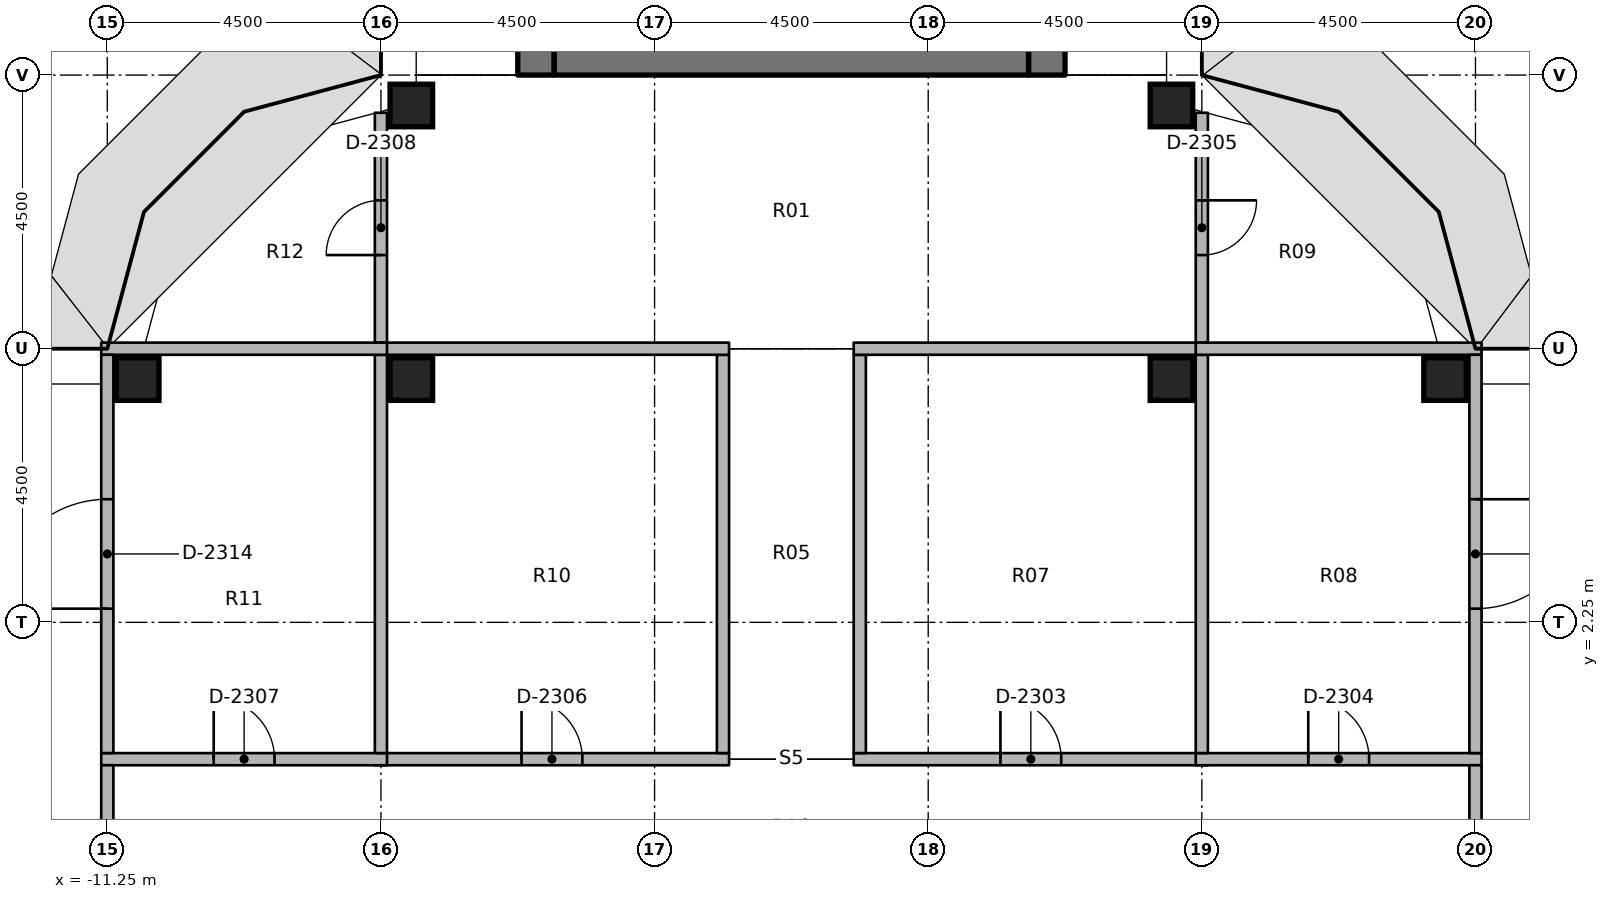
"""IFC4 building model, lengths in metres.
Left out: names, types, materials, properties, quantities, classifications, styles, units other than length and angle.
Written with IfcOpenShell. Run it as: python <this file> out.ifc"""

import sys

from ifc_helpers import new_model, si_unit, direction, frame, frame_2d, origin, origin_2d, place, context, subcontext, project, spatial, rectangle, extrude, element, fill, save


model = new_model("IFC4")
c1 = context("Model", 3, precision=1e-05, world=origin(), true_north=direction((0.0, 1.0)))
c2 = subcontext(c1, "Body", "Model", "MODEL_VIEW")
j1 = project(units=[si_unit("LENGTHUNIT", "METRE"), si_unit("PLANEANGLEUNIT", "RADIAN")], contexts=[c1])
p1 = place(None, origin())
s1 = spatial("IfcSite", under=j1, at=p1, CompositionType="ELEMENT")
p2 = place(p1, origin())
s2 = spatial("IfcBuilding", under=s1, at=p2, CompositionType="ELEMENT")
p3 = place(p2, frame((0.0, 0.0, 218.2)))
s3 = spatial("IfcBuildingStorey", under=s2, at=p3, CompositionType="ELEMENT", Elevation=218.2)
for number, where, z_axis, x_axis in (
    (1, (-10.75, 6.25, 0.0), (0.0, 0.0, 1.0), (1.0, 0.0, 0.0)),
    (2, (-6.25, 6.25, 0.0), (0.0, 0.0, 1.0), (1.0, 0.0, 0.0)),
    (3, (-6.25, 10.75, 0.0), (0.0, 0.0, 1.0), (1.0, 0.0, 0.0)),
    (4, (6.25, 6.25, 0.0), (0.0, 0.0, 1.0), (1.0, 0.0, 0.0)),
    (5, (6.25, 10.75, 0.0), (0.0, 0.0, 1.0), (1.0, 0.0, 0.0)),
    (6, (10.75, 6.25, 0.0), (0.0, 0.0, 1.0), (1.0, 0.0, 0.0)),
):
    element("IfcColumn", number, at=place(p3, frame(where, z_axis=z_axis, x_axis=x_axis)), inside=s3, PredefinedType="COLUMN", context=c2, shape_type="SweptSolid", body=[
        extrude(rectangle(XDim=0.7, YDim=0.7, at=origin_2d()), origin(), (0.0, 0.0, 1.0), 3.65),
    ])
p4 = place(p3, frame((-4.2, 11.25, 0.0), z_axis=(0.0, 0.0, 1.0), x_axis=(0.0, 1.0, 0.0)))
e7 = element("IfcWall", 7, at=p4, inside=s3, PredefinedType="SHEAR", context=c2, shape_type="SweptSolid", body=[
    extrude(rectangle(XDim=15.0, YDim=0.6, at=frame_2d((7.5, 0.0))), origin(), (0.0, 0.0, 1.0), 3.8),
])
p5 = place(p4, frame((7.15, 0.0, 0.0)))
e8 = element("IfcOpeningElement", 8, at=p5, cuts=e7, PredefinedType="OPENING", context=c2, shape_type="SweptSolid", body=[
    extrude(rectangle(XDim=1.5, YDim=2.3, at=frame_2d((0.75, 1.15))), frame((0.0, 0.31, 0.0), z_axis=(0.0, -1.0, 0.0), x_axis=(1.0, 0.0, 0.0)), (0.0, 0.0, 1.0), 0.62),
])
p6 = place(p4, frame((13.9, 0.0, 0.0)))
e9 = element("IfcOpeningElement", 9, at=p6, cuts=e7, PredefinedType="OPENING", context=c2, shape_type="SweptSolid", body=[
    extrude(rectangle(XDim=0.9, YDim=2.1, at=frame_2d((0.45, 1.05))), frame((0.0, 0.31, 0.0), z_axis=(0.0, -1.0, 0.0), x_axis=(1.0, 0.0, 0.0)), (0.0, 0.0, 1.0), 0.62),
])
p7 = place(p4, frame((1.15, 0.0, 0.0)))
e10 = element("IfcOpeningElement", 10, at=p7, cuts=e7, PredefinedType="OPENING", context=c2, shape_type="SweptSolid", body=[
    extrude(rectangle(XDim=1.2, YDim=2.1, at=frame_2d((0.6, 1.05))), frame((0.0, 0.31, 0.0), z_axis=(0.0, -1.0, 0.0), x_axis=(1.0, 0.0, 0.0)), (0.0, 0.0, 1.0), 0.62),
])
p8 = place(p3, frame((4.2, 11.25, 0.0), z_axis=(0.0, 0.0, 1.0), x_axis=(0.0, 1.0, 0.0)))
e11 = element("IfcWall", 11, at=p8, inside=s3, PredefinedType="SHEAR", context=c2, shape_type="SweptSolid", body=[
    extrude(rectangle(XDim=15.0, YDim=0.6, at=frame_2d((7.5, 0.0))), origin(), (0.0, 0.0, 1.0), 3.8),
])
p9 = place(p8, frame((7.15, 0.0, 0.0)))
e12 = element("IfcOpeningElement", 12, at=p9, cuts=e11, PredefinedType="OPENING", context=c2, shape_type="SweptSolid", body=[
    extrude(rectangle(XDim=1.5, YDim=2.3, at=frame_2d((0.75, 1.15))), frame((0.0, 0.31, 0.0), z_axis=(0.0, -1.0, 0.0), x_axis=(1.0, 0.0, 0.0)), (0.0, 0.0, 1.0), 0.62),
])
p10 = place(p8, frame((5.55, 0.0, 0.0)))
e13 = element("IfcOpeningElement", 13, at=p10, cuts=e11, PredefinedType="OPENING", context=c2, shape_type="SweptSolid", body=[
    extrude(rectangle(XDim=1.2, YDim=2.1, at=frame_2d((0.6, 1.05))), frame((0.0, 0.31, 0.0), z_axis=(0.0, -1.0, 0.0), x_axis=(1.0, 0.0, 0.0)), (0.0, 0.0, 1.0), 0.62),
])
p11 = place(p3, frame((-3.9, 11.55, 0.0), z_axis=(0.0, 0.0, 1.0), x_axis=(1.0, 0.0, 0.0)))
e14 = element("IfcWall", 14, at=p11, inside=s3, PredefinedType="SHEAR", context=c2, shape_type="SweptSolid", body=[
    extrude(rectangle(XDim=7.8, YDim=0.6, at=frame_2d((3.9, 0.0))), origin(), (0.0, 0.0, 1.0), 3.8),
])
p12 = place(p3, frame((1.025, 0.0, 0.0), z_axis=(0.0, 0.0, 1.0), x_axis=(1.0, 0.0, 0.0)))
e15 = element("IfcWall", 15, at=p12, inside=s3, PredefinedType="PARTITIONING", context=c2, shape_type="SweptSolid", body=[
    extrude(rectangle(XDim=5.825, YDim=0.2, at=frame_2d((2.913, 0.0))), origin(), (0.0, 0.0, 1.0), 2.75),
])
p13 = place(p12, frame((2.413, 0.0, 0.0)))
e16 = element("IfcOpeningElement", 16, at=p13, cuts=e15, PredefinedType="OPENING", context=c2, shape_type="SweptSolid", body=[
    extrude(rectangle(XDim=1.0, YDim=2.1, at=frame_2d((0.5, 1.05))), frame((0.0, 0.11, 0.0), z_axis=(0.0, -1.0, 0.0), x_axis=(1.0, 0.0, 0.0)), (0.0, 0.0, 1.0), 0.22),
])
p14 = place(p3, frame((6.65, 0.0, 0.0), z_axis=(0.0, 0.0, 1.0), x_axis=(1.0, 0.0, 0.0)))
e17 = element("IfcWall", 17, at=p14, inside=s3, PredefinedType="PARTITIONING", context=c2, shape_type="SweptSolid", body=[
    extrude(rectangle(XDim=4.7, YDim=0.2, at=frame_2d((2.35, 0.0))), origin(), (0.0, 0.0, 1.0), 2.75),
])
p15 = place(p14, frame((1.85, 0.0, 0.0)))
e18 = element("IfcOpeningElement", 18, at=p15, cuts=e17, PredefinedType="OPENING", context=c2, shape_type="SweptSolid", body=[
    extrude(rectangle(XDim=1.0, YDim=2.1, at=frame_2d((0.5, 1.05))), frame((0.0, 0.11, 0.0), z_axis=(0.0, -1.0, 0.0), x_axis=(1.0, 0.0, 0.0)), (0.0, 0.0, 1.0), 0.22),
])
p16 = place(p3, frame((-6.85, 0.0, 0.0), z_axis=(0.0, 0.0, 1.0), x_axis=(1.0, 0.0, 0.0)))
e19 = element("IfcWall", 19, at=p16, inside=s3, PredefinedType="PARTITIONING", context=c2, shape_type="SweptSolid", body=[
    extrude(rectangle(XDim=5.825, YDim=0.2, at=frame_2d((2.913, 0.0))), origin(), (0.0, 0.0, 1.0), 2.75),
])
p17 = place(p16, frame((2.413, 0.0, 0.0)))
e20 = element("IfcOpeningElement", 20, at=p17, cuts=e19, PredefinedType="OPENING", context=c2, shape_type="SweptSolid", body=[
    extrude(rectangle(XDim=1.0, YDim=2.1, at=frame_2d((0.5, 1.05))), frame((0.0, 0.11, 0.0), z_axis=(0.0, -1.0, 0.0), x_axis=(1.0, 0.0, 0.0)), (0.0, 0.0, 1.0), 0.22),
])
p18 = place(p3, frame((-11.35, 0.0, 0.0), z_axis=(0.0, 0.0, 1.0), x_axis=(1.0, 0.0, 0.0)))
e21 = element("IfcWall", 21, at=p18, inside=s3, PredefinedType="PARTITIONING", context=c2, shape_type="SweptSolid", body=[
    extrude(rectangle(XDim=4.7, YDim=0.2, at=frame_2d((2.35, 0.0))), origin(), (0.0, 0.0, 1.0), 2.75),
])
p19 = place(p18, frame((1.85, 0.0, 0.0)))
e22 = element("IfcOpeningElement", 22, at=p19, cuts=e21, PredefinedType="OPENING", context=c2, shape_type="SweptSolid", body=[
    extrude(rectangle(XDim=1.0, YDim=2.1, at=frame_2d((0.5, 1.05))), frame((0.0, 0.11, 0.0), z_axis=(0.0, -1.0, 0.0), x_axis=(1.0, 0.0, 0.0)), (0.0, 0.0, 1.0), 0.22),
])
for number, where, z_axis, x_axis in (
    (23, (11.25, -2.15, 0.0), (0.0, 0.0, 1.0), (0.0, 1.0, 0.0)),
    (24, (-11.25, -2.15, 0.0), (0.0, 0.0, 1.0), (0.0, 1.0, 0.0)),
):
    element("IfcWall", number, at=place(p3, frame(where, z_axis=z_axis, x_axis=x_axis)), inside=s3, PredefinedType="PARTITIONING", context=c2, shape_type="SweptSolid", body=[
        extrude(rectangle(XDim=2.05, YDim=0.2, at=frame_2d((1.025, 0.0))), origin(), (0.0, 0.0, 1.0), 2.75),
    ])
for number, where, z_axis, x_axis in (
    (25, (1.125, 0.1, 0.0), (0.0, 0.0, 1.0), (0.0, 1.0, 0.0)),
    (26, (-1.125, 0.1, 0.0), (0.0, 0.0, 1.0), (0.0, 1.0, 0.0)),
):
    element("IfcWall", number, at=place(p3, frame(where, z_axis=z_axis, x_axis=x_axis)), inside=s3, PredefinedType="PARTITIONING", context=c2, shape_type="SweptSolid", body=[
        extrude(rectangle(XDim=6.55, YDim=0.2, at=frame_2d((3.275, 0.0))), origin(), (0.0, 0.0, 1.0), 2.75),
    ])
p20 = place(p3, frame((1.025, 6.75, 0.0), z_axis=(0.0, 0.0, 1.0), x_axis=(1.0, 0.0, 0.0)))
e27 = element("IfcWall", 27, at=p20, inside=s3, PredefinedType="PARTITIONING", context=c2, shape_type="SweptSolid", body=[
    extrude(rectangle(XDim=5.825, YDim=0.2, at=frame_2d((2.913, 0.0))), origin(), (0.0, 0.0, 1.0), 2.75),
])
p21 = place(p3, frame((6.75, 10.63, 0.0), z_axis=(0.0, 0.0, 1.0), x_axis=(0.0, -1.0, 0.0)))
e28 = element("IfcWall", 28, at=p21, inside=s3, PredefinedType="PARTITIONING", context=c2, shape_type="SweptSolid", body=[
    extrude(rectangle(XDim=3.78, YDim=0.2, at=frame_2d((1.89, 0.0))), origin(), (0.0, 0.0, 1.0), 2.75),
])
p22 = place(p21, frame((1.44, 0.0, 0.0)))
e29 = element("IfcOpeningElement", 29, at=p22, cuts=e28, PredefinedType="OPENING", context=c2, shape_type="SweptSolid", body=[
    extrude(rectangle(XDim=0.9, YDim=2.1, at=frame_2d((0.45, 1.05))), frame((0.0, 0.11, 0.0), z_axis=(0.0, -1.0, 0.0), x_axis=(1.0, 0.0, 0.0)), (0.0, 0.0, 1.0), 0.22),
])
p23 = place(p3, frame((-6.85, 6.75, 0.0), z_axis=(0.0, 0.0, 1.0), x_axis=(1.0, 0.0, 0.0)))
e30 = element("IfcWall", 30, at=p23, inside=s3, PredefinedType="PARTITIONING", context=c2, shape_type="SweptSolid", body=[
    extrude(rectangle(XDim=5.825, YDim=0.2, at=frame_2d((2.913, 0.0))), origin(), (0.0, 0.0, 1.0), 2.75),
])
p24 = place(p3, frame((-6.75, 6.85, 0.0), z_axis=(0.0, 0.0, 1.0), x_axis=(0.0, 1.0, 0.0)))
e31 = element("IfcWall", 31, at=p24, inside=s3, PredefinedType="PARTITIONING", context=c2, shape_type="SweptSolid", body=[
    extrude(rectangle(XDim=3.78, YDim=0.2, at=frame_2d((1.89, 0.0))), origin(), (0.0, 0.0, 1.0), 2.75),
])
p25 = place(p24, frame((1.44, 0.0, 0.0)))
e32 = element("IfcOpeningElement", 32, at=p25, cuts=e31, PredefinedType="OPENING", context=c2, shape_type="SweptSolid", body=[
    extrude(rectangle(XDim=0.9, YDim=2.1, at=frame_2d((0.45, 1.05))), frame((0.0, 0.11, 0.0), z_axis=(0.0, -1.0, 0.0), x_axis=(1.0, 0.0, 0.0)), (0.0, 0.0, 1.0), 0.22),
])
p26 = place(p3, frame((6.75, 0.1, 0.0), z_axis=(0.0, 0.0, 1.0), x_axis=(0.0, 1.0, 0.0)))
e33 = element("IfcWall", 33, at=p26, inside=s3, PredefinedType="PARTITIONING", context=c2, shape_type="SweptSolid", body=[
    extrude(rectangle(XDim=6.55, YDim=0.2, at=frame_2d((3.275, 0.0))), origin(), (0.0, 0.0, 1.0), 2.75),
])
p27 = place(p3, frame((6.65, 6.75, 0.0), z_axis=(0.0, 0.0, 1.0), x_axis=(1.0, 0.0, 0.0)))
e34 = element("IfcWall", 34, at=p27, inside=s3, PredefinedType="PARTITIONING", context=c2, shape_type="SweptSolid", body=[
    extrude(rectangle(XDim=4.7, YDim=0.2, at=frame_2d((2.35, 0.0))), origin(), (0.0, 0.0, 1.0), 2.75),
])
p28 = place(p3, frame((11.25, 6.65, 0.0), z_axis=(0.0, 0.0, 1.0), x_axis=(0.0, -1.0, 0.0)))
e35 = element("IfcWall", 35, at=p28, inside=s3, PredefinedType="PARTITIONING", context=c2, shape_type="SweptSolid", body=[
    extrude(rectangle(XDim=6.55, YDim=0.2, at=frame_2d((3.275, 0.0))), origin(), (0.0, 0.0, 1.0), 2.75),
])
p29 = place(p28, frame((2.375, 0.0, 0.0)))
e36 = element("IfcOpeningElement", 36, at=p29, cuts=e35, PredefinedType="OPENING", context=c2, shape_type="SweptSolid", body=[
    extrude(rectangle(XDim=1.8, YDim=2.1, at=frame_2d((0.9, 1.05))), frame((0.0, 0.11, 0.0), z_axis=(0.0, -1.0, 0.0), x_axis=(1.0, 0.0, 0.0)), (0.0, 0.0, 1.0), 0.22),
])
p30 = place(p3, frame((-6.75, 0.1, 0.0), z_axis=(0.0, 0.0, 1.0), x_axis=(0.0, 1.0, 0.0)))
e37 = element("IfcWall", 37, at=p30, inside=s3, PredefinedType="PARTITIONING", context=c2, shape_type="SweptSolid", body=[
    extrude(rectangle(XDim=6.55, YDim=0.2, at=frame_2d((3.275, 0.0))), origin(), (0.0, 0.0, 1.0), 2.75),
])
p31 = place(p3, frame((-11.35, 6.75, 0.0), z_axis=(0.0, 0.0, 1.0), x_axis=(1.0, 0.0, 0.0)))
e38 = element("IfcWall", 38, at=p31, inside=s3, PredefinedType="PARTITIONING", context=c2, shape_type="SweptSolid", body=[
    extrude(rectangle(XDim=4.7, YDim=0.2, at=frame_2d((2.35, 0.0))), origin(), (0.0, 0.0, 1.0), 2.75),
])
p32 = place(p3, frame((-11.25, 0.1, 0.0), z_axis=(0.0, 0.0, 1.0), x_axis=(0.0, 1.0, 0.0)))
e39 = element("IfcWall", 39, at=p32, inside=s3, PredefinedType="PARTITIONING", context=c2, shape_type="SweptSolid", body=[
    extrude(rectangle(XDim=6.55, YDim=0.2, at=frame_2d((3.275, 0.0))), origin(), (0.0, 0.0, 1.0), 2.75),
])
p33 = place(p32, frame((2.375, 0.0, 0.0)))
e40 = element("IfcOpeningElement", 40, at=p33, cuts=e39, PredefinedType="OPENING", context=c2, shape_type="SweptSolid", body=[
    extrude(rectangle(XDim=1.8, YDim=2.1, at=frame_2d((0.9, 1.05))), frame((0.0, 0.11, 0.0), z_axis=(0.0, -1.0, 0.0), x_axis=(1.0, 0.0, 0.0)), (0.0, 0.0, 1.0), 0.22),
])
p34 = place(p29, origin())
e41 = element("IfcDoor", 41, at=p34, inside=s3, OperationType="DOUBLE_DOOR_SINGLE_SWING", PredefinedType="DOOR", context=c2, shape_type="SweptSolid", body=[
    extrude(rectangle(XDim=1.8, YDim=2.1, at=frame_2d((0.9, 1.05))), frame((0.0, 0.025, 0.0), z_axis=(0.0, -1.0, 0.0), x_axis=(1.0, 0.0, 0.0)), (0.0, 0.0, 1.0), 0.05),
])
fill(e36, e41)
p35 = place(p13, origin())
e42 = element("IfcDoor", 42, at=p35, inside=s3, OperationType="SINGLE_SWING_RIGHT", PredefinedType="DOOR", context=c2, shape_type="SweptSolid", body=[
    extrude(rectangle(XDim=1.0, YDim=2.1, at=frame_2d((0.5, 1.05))), frame((0.0, 0.025, 0.0), z_axis=(0.0, -1.0, 0.0), x_axis=(1.0, 0.0, 0.0)), (0.0, 0.0, 1.0), 0.05),
])
fill(e16, e42)
p36 = place(p15, origin())
e43 = element("IfcDoor", 43, at=p36, inside=s3, OperationType="SINGLE_SWING_RIGHT", PredefinedType="DOOR", context=c2, shape_type="SweptSolid", body=[
    extrude(rectangle(XDim=1.0, YDim=2.1, at=frame_2d((0.5, 1.05))), frame((0.0, 0.025, 0.0), z_axis=(0.0, -1.0, 0.0), x_axis=(1.0, 0.0, 0.0)), (0.0, 0.0, 1.0), 0.05),
])
fill(e18, e43)
p37 = place(p22, origin())
e44 = element("IfcDoor", 44, at=p37, inside=s3, OperationType="SINGLE_SWING_RIGHT", PredefinedType="DOOR", context=c2, shape_type="SweptSolid", body=[
    extrude(rectangle(XDim=0.9, YDim=2.1, at=frame_2d((0.45, 1.05))), frame((0.0, 0.025, 0.0), z_axis=(0.0, -1.0, 0.0), x_axis=(1.0, 0.0, 0.0)), (0.0, 0.0, 1.0), 0.05),
])
fill(e29, e44)
p38 = place(p17, origin())
e45 = element("IfcDoor", 45, at=p38, inside=s3, OperationType="SINGLE_SWING_RIGHT", PredefinedType="DOOR", context=c2, shape_type="SweptSolid", body=[
    extrude(rectangle(XDim=1.0, YDim=2.1, at=frame_2d((0.5, 1.05))), frame((0.0, 0.025, 0.0), z_axis=(0.0, -1.0, 0.0), x_axis=(1.0, 0.0, 0.0)), (0.0, 0.0, 1.0), 0.05),
])
fill(e20, e45)
p39 = place(p19, origin())
e46 = element("IfcDoor", 46, at=p39, inside=s3, OperationType="SINGLE_SWING_RIGHT", PredefinedType="DOOR", context=c2, shape_type="SweptSolid", body=[
    extrude(rectangle(XDim=1.0, YDim=2.1, at=frame_2d((0.5, 1.05))), frame((0.0, 0.025, 0.0), z_axis=(0.0, -1.0, 0.0), x_axis=(1.0, 0.0, 0.0)), (0.0, 0.0, 1.0), 0.05),
])
fill(e22, e46)
p40 = place(p25, origin())
e47 = element("IfcDoor", 47, at=p40, inside=s3, OperationType="SINGLE_SWING_LEFT", PredefinedType="DOOR", context=c2, shape_type="SweptSolid", body=[
    extrude(rectangle(XDim=0.9, YDim=2.1, at=frame_2d((0.45, 1.05))), frame((0.0, 0.025, 0.0), z_axis=(0.0, -1.0, 0.0), x_axis=(1.0, 0.0, 0.0)), (0.0, 0.0, 1.0), 0.05),
])
fill(e32, e47)
p41 = place(p33, origin())
e48 = element("IfcDoor", 48, at=p41, inside=s3, OperationType="DOUBLE_DOOR_SINGLE_SWING", PredefinedType="DOOR", context=c2, shape_type="SweptSolid", body=[
    extrude(rectangle(XDim=1.8, YDim=2.1, at=frame_2d((0.9, 1.05))), frame((0.0, 0.025, 0.0), z_axis=(0.0, -1.0, 0.0), x_axis=(1.0, 0.0, 0.0)), (0.0, 0.0, 1.0), 0.05),
])
fill(e40, e48)
save(model, sys.argv[1])
